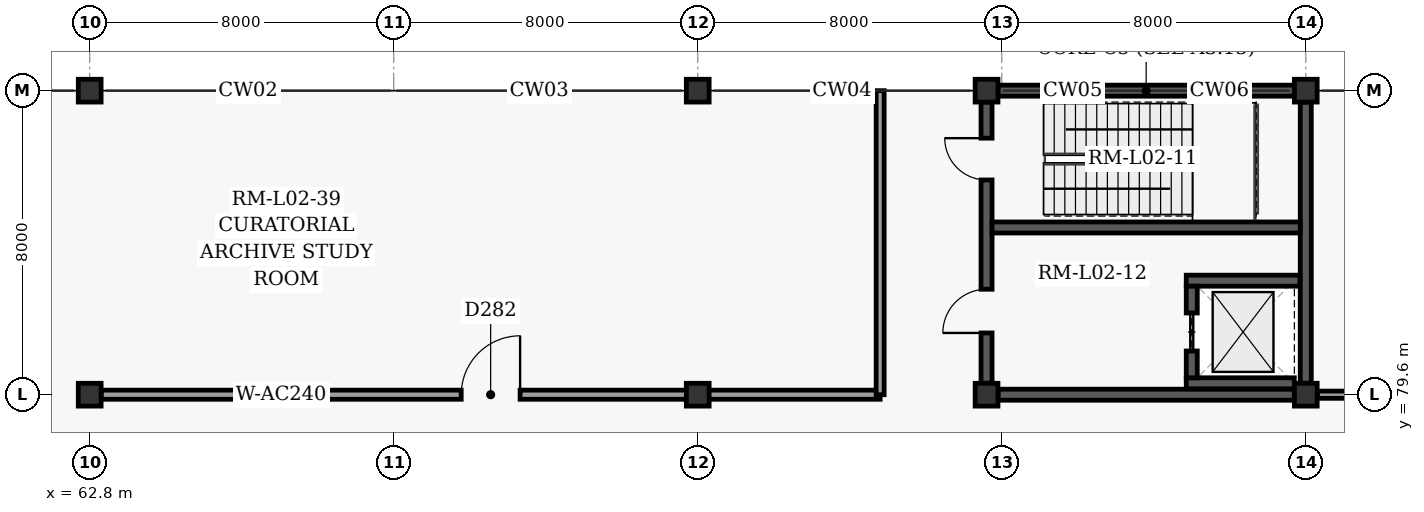
"""IFC4 building model, lengths in metres.
Left out: names, types, materials, properties, quantities, classifications, styles, units other than length and angle.
Written with IfcOpenShell. Run it as: python <this file> out.ifc"""

import sys

from ifc_helpers import new_model, si_unit, direction, frame, frame_2d, origin, origin_2d, place, context, subcontext, project, spatial, rectangle, extrude, element, fill, save


model = new_model("IFC4")
c1 = context("Model", 3, precision=1e-05, world=origin(), true_north=direction((0.0, 1.0)))
c2 = subcontext(c1, "Body", "Model", "MODEL_VIEW")
j1 = project(units=[si_unit("LENGTHUNIT", "METRE"), si_unit("PLANEANGLEUNIT", "RADIAN")], contexts=[c1])
p1 = place(None, origin())
s1 = spatial("IfcSite", under=j1, at=p1, CompositionType="ELEMENT")
p2 = place(p1, origin())
s2 = spatial("IfcBuilding", under=s1, at=p2, CompositionType="ELEMENT")
p3 = place(p2, frame((0.0, 0.0, 10.2)))
s3 = spatial("IfcBuildingStorey", under=s2, at=p3, CompositionType="ELEMENT", Elevation=10.2)
for number, where, z_axis, x_axis in (
    (1, (62.8, 79.6, 0.0), (0.0, 0.0, 1.0), (1.0, 0.0, 0.0)),
    (2, (62.8, 87.6, 0.0), (0.0, 0.0, 1.0), (1.0, 0.0, 0.0)),
    (3, (78.8, 79.6, 0.0), (0.0, 0.0, 1.0), (1.0, 0.0, 0.0)),
    (4, (78.8, 87.6, 0.0), (0.0, 0.0, 1.0), (1.0, 0.0, 0.0)),
    (5, (86.4, 79.6, 0.0), (0.0, 0.0, 1.0), (1.0, 0.0, 0.0)),
    (6, (86.4, 87.6, 0.0), (0.0, 0.0, 1.0), (1.0, 0.0, 0.0)),
    (7, (94.8, 79.6, 0.0), (0.0, 0.0, 1.0), (1.0, 0.0, 0.0)),
    (8, (94.8, 87.6, 0.0), (0.0, 0.0, 1.0), (1.0, 0.0, 0.0)),
):
    element("IfcColumn", number, at=place(p3, frame(where, z_axis=z_axis, x_axis=x_axis)), inside=s3, PredefinedType="COLUMN", context=c2, shape_type="SweptSolid", body=[
        extrude(rectangle(XDim=0.6, YDim=0.6, at=origin_2d()), origin(), (0.0, 0.0, 1.0), 5.4),
    ])
for number, where, z_axis, x_axis in (
    (9, (86.702, 79.6, 0.0), (0.0, 0.0, 1.0), (1.0, 0.0, 0.0)),
    (10, (86.702, 87.6, 0.0), (0.0, 0.0, 1.0), (1.0, 0.0, 0.0)),
):
    element("IfcWall", number, at=place(p3, frame(where, z_axis=z_axis, x_axis=x_axis)), inside=s3, PredefinedType="SHEAR", context=c2, shape_type="SweptSolid", body=[
        extrude(rectangle(XDim=7.796, YDim=0.29, at=frame_2d((3.898, 0.0))), origin(), (0.0, 0.0, 1.0), 5.16),
    ])
p4 = place(p3, frame((86.4, 79.902, 0.0), z_axis=(0.0, 0.0, 1.0), x_axis=(0.0, 1.0, 0.0)))
e11 = element("IfcWall", 11, at=p4, inside=s3, PredefinedType="SHEAR", context=c2, shape_type="SweptSolid", body=[
    extrude(rectangle(XDim=7.396, YDim=0.29, at=frame_2d((3.698, 0.0))), origin(), (0.0, 0.0, 1.0), 5.16),
])
p5 = place(p4, frame((5.348, 0.0, 0.0)))
e12 = element("IfcOpeningElement", 12, at=p5, cuts=e11, PredefinedType="OPENING", context=c2, shape_type="SweptSolid", body=[
    extrude(rectangle(XDim=1.1, YDim=2.15, at=frame_2d((0.55, 1.075))), frame((0.0, 0.155, 0.0), z_axis=(0.0, -1.0, 0.0), x_axis=(1.0, 0.0, 0.0)), (0.0, 0.0, 1.0), 0.31),
])
p6 = place(p4, frame((1.323, 0.0, 0.0)))
e13 = element("IfcOpeningElement", 13, at=p6, cuts=e11, PredefinedType="OPENING", context=c2, shape_type="SweptSolid", body=[
    extrude(rectangle(XDim=1.15, YDim=2.2, at=frame_2d((0.575, 1.1))), frame((0.0, 0.155, 0.0), z_axis=(0.0, -1.0, 0.0), x_axis=(1.0, 0.0, 0.0)), (0.0, 0.0, 1.0), 0.31),
])
p7 = place(p3, frame((94.8, 79.902, 0.0), z_axis=(0.0, 0.0, 1.0), x_axis=(0.0, 1.0, 0.0)))
e14 = element("IfcWall", 14, at=p7, inside=s3, PredefinedType="SHEAR", context=c2, shape_type="SweptSolid", body=[
    extrude(rectangle(XDim=7.396, YDim=0.29, at=frame_2d((3.698, 0.0))), origin(), (0.0, 0.0, 1.0), 5.16),
])
p8 = place(p3, frame((86.545, 84.0, 0.0), z_axis=(0.0, 0.0, 1.0), x_axis=(1.0, 0.0, 0.0)))
e15 = element("IfcWall", 15, at=p8, inside=s3, PredefinedType="SHEAR", context=c2, shape_type="SweptSolid", body=[
    extrude(rectangle(XDim=8.11, YDim=0.29, at=frame_2d((4.055, 0.0))), origin(), (0.0, 0.0, 1.0), 5.16),
])
p9 = place(p3, frame((91.655, 79.9, 0.0), z_axis=(0.0, 0.0, 1.0), x_axis=(1.0, 0.0, 0.0)))
e16 = element("IfcWall", 16, at=p9, inside=s3, PredefinedType="SHEAR", context=c2, shape_type="SweptSolid", body=[
    extrude(rectangle(XDim=2.843, YDim=0.29, at=frame_2d((1.421, 0.0))), origin(), (0.0, 0.0, 1.0), 5.16),
])
p10 = place(p3, frame((91.655, 82.6, 0.0), z_axis=(0.0, 0.0, 1.0), x_axis=(1.0, 0.0, 0.0)))
e17 = element("IfcWall", 17, at=p10, inside=s3, PredefinedType="SHEAR", context=c2, shape_type="SweptSolid", body=[
    extrude(rectangle(XDim=2.99, YDim=0.29, at=frame_2d((1.495, 0.0))), origin(), (0.0, 0.0, 1.0), 5.16),
])
p11 = place(p3, frame((91.8, 80.045, 0.0), z_axis=(0.0, 0.0, 1.0), x_axis=(0.0, 1.0, 0.0)))
e18 = element("IfcWall", 18, at=p11, inside=s3, PredefinedType="SHEAR", context=c2, shape_type="SweptSolid", body=[
    extrude(rectangle(XDim=2.41, YDim=0.29, at=frame_2d((1.205, 0.0))), origin(), (0.0, 0.0, 1.0), 5.16),
])
p12 = place(p11, frame((0.705, 0.0, 0.0)))
e19 = element("IfcOpeningElement", 19, at=p12, cuts=e18, PredefinedType="OPENING", context=c2, shape_type="SweptSolid", body=[
    extrude(rectangle(XDim=1.0, YDim=2.15, at=frame_2d((0.5, 1.075))), frame((0.0, 0.155, 0.0), z_axis=(0.0, -1.0, 0.0), x_axis=(1.0, 0.0, 0.0)), (0.0, 0.0, 1.0), 0.31),
])
p13 = place(p3, frame((63.102, 79.6, 0.0), z_axis=(0.0, 0.0, 1.0), x_axis=(1.0, 0.0, 0.0)))
e20 = element("IfcWall", 20, at=p13, inside=s3, PredefinedType="PARTITIONING", context=c2, shape_type="SweptSolid", body=[
    extrude(rectangle(XDim=20.498, YDim=0.24, at=frame_2d((10.249, 0.0))), origin(), (0.0, 0.0, 1.0), 4.797),
])
p14 = place(p13, frame((9.474, 0.0, 0.0)))
e21 = element("IfcOpeningElement", 21, at=p14, cuts=e20, PredefinedType="OPENING", context=c2, shape_type="SweptSolid", body=[
    extrude(rectangle(XDim=1.55, YDim=2.25, at=frame_2d((0.775, 1.125))), frame((0.0, 0.13, 0.0), z_axis=(0.0, -1.0, 0.0), x_axis=(1.0, 0.0, 0.0)), (0.0, 0.0, 1.0), 0.26),
])
p15 = place(p3, frame((83.6, 79.6, 0.0), z_axis=(0.0, 0.0, 1.0), x_axis=(0.0, 1.0, 0.0)))
e22 = element("IfcWall", 22, at=p15, inside=s3, PredefinedType="PARTITIONING", context=c2, shape_type="SweptSolid", body=[
    extrude(rectangle(XDim=8.0, YDim=0.21, at=frame_2d((4.0, 0.0))), origin(), (0.0, 0.0, 1.0), 5.16),
])
p16 = place(p3, frame((95.102, 79.6, 0.0), z_axis=(0.0, 0.0, 1.0), x_axis=(1.0, 0.0, 0.0)))
e23 = element("IfcWall", 23, at=p16, inside=s3, PredefinedType="PARTITIONING", context=c2, shape_type="SweptSolid", body=[
    extrude(rectangle(XDim=43.996, YDim=0.19, at=frame_2d((21.998, 0.0))), origin(), (0.0, 0.0, 1.0), 4.51),
])
p17 = place(p16, frame((21.198, 0.0, 0.0)))
e24 = element("IfcOpeningElement", 24, at=p17, cuts=e23, PredefinedType="OPENING", context=c2, shape_type="SweptSolid", body=[
    extrude(rectangle(XDim=1.6, YDim=2.3, at=frame_2d((0.8, 1.15))), frame((0.0, 0.105, 0.0), z_axis=(0.0, -1.0, 0.0), x_axis=(1.0, 0.0, 0.0)), (0.0, 0.0, 1.0), 0.21),
])
p18 = place(p16, frame((33.617, 0.0, 0.0)))
e25 = element("IfcOpeningElement", 25, at=p18, cuts=e23, PredefinedType="OPENING", context=c2, shape_type="SweptSolid", body=[
    extrude(rectangle(XDim=1.4, YDim=2.25, at=frame_2d((0.7, 1.125))), frame((0.0, 0.105, 0.0), z_axis=(0.0, -1.0, 0.0), x_axis=(1.0, 0.0, 0.0)), (0.0, 0.0, 1.0), 0.21),
])
p19 = place(p5, origin())
e26 = element("IfcDoor", 26, at=p19, inside=s3, OperationType="SINGLE_SWING_RIGHT", PredefinedType="DOOR", context=c2, shape_type="SweptSolid", body=[
    extrude(rectangle(XDim=1.1, YDim=2.15, at=frame_2d((0.55, 1.075))), frame((0.0, 0.025, 0.0), z_axis=(0.0, -1.0, 0.0), x_axis=(1.0, 0.0, 0.0)), (0.0, 0.0, 1.0), 0.05),
])
fill(e12, e26)
p20 = place(p6, origin())
e27 = element("IfcDoor", 27, at=p20, inside=s3, OperationType="SINGLE_SWING_LEFT", PredefinedType="DOOR", context=c2, shape_type="SweptSolid", body=[
    extrude(rectangle(XDim=1.15, YDim=2.2, at=frame_2d((0.575, 1.1))), frame((0.0, 0.025, 0.0), z_axis=(0.0, -1.0, 0.0), x_axis=(1.0, 0.0, 0.0)), (0.0, 0.0, 1.0), 0.05),
])
fill(e13, e27)
p21 = place(p12, origin())
e28 = element("IfcDoor", 28, at=p21, inside=s3, OperationType="SLIDING_TO_LEFT", PredefinedType="DOOR", context=c2, shape_type="SweptSolid", body=[
    extrude(rectangle(XDim=1.0, YDim=2.15, at=frame_2d((0.5, 1.075))), frame((0.0, 0.025, 0.0), z_axis=(0.0, -1.0, 0.0), x_axis=(1.0, 0.0, 0.0)), (0.0, 0.0, 1.0), 0.05),
])
fill(e19, e28)
p22 = place(p14, origin())
e29 = element("IfcDoor", 29, at=p22, inside=s3, OperationType="SINGLE_SWING_RIGHT", PredefinedType="DOOR", context=c2, shape_type="SweptSolid", body=[
    extrude(rectangle(XDim=1.55, YDim=2.25, at=frame_2d((0.775, 1.125))), frame((0.0, 0.025, 0.0), z_axis=(0.0, -1.0, 0.0), x_axis=(1.0, 0.0, 0.0)), (0.0, 0.0, 1.0), 0.05),
])
fill(e21, e29)
save(model, sys.argv[1])
